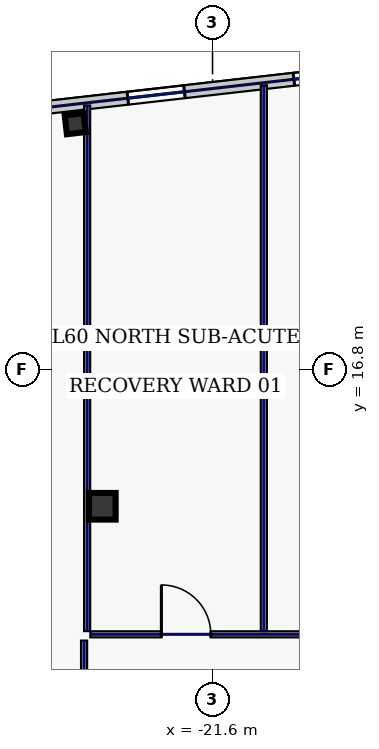
"""IFC4 building model, lengths in metres.
Left out: names, types, materials, properties, quantities, classifications, styles, units other than length and angle.
Written with IfcOpenShell. Run it as: python <this file> out.ifc"""

import sys

from ifc_helpers import new_model, si_unit, direction, frame, frame_2d, origin, origin_2d, place, context, subcontext, project, spatial, rectangle, hollow_rectangle, extrude, element, fill, save


model = new_model("IFC4")
c1 = context("Model", 3, precision=1e-05, world=origin(), true_north=direction((0.0, 1.0)))
c2 = subcontext(c1, "Body", "Model", "MODEL_VIEW")
j1 = project(units=[si_unit("LENGTHUNIT", "METRE"), si_unit("PLANEANGLEUNIT", "RADIAN")], contexts=[c1])
p1 = place(None, origin())
s1 = spatial("IfcSite", under=j1, at=p1, CompositionType="ELEMENT")
p2 = place(p1, origin())
s2 = spatial("IfcBuilding", under=s1, at=p2, CompositionType="ELEMENT")
p3 = place(p2, frame((0.0, 0.0, 259.0)))
s3 = spatial("IfcBuildingStorey", under=s2, at=p3, CompositionType="ELEMENT", Elevation=259.0)
p4 = place(p3, frame((-24.5, 13.2, 0.0), z_axis=(0.0, 0.0, 1.0), x_axis=(1.0, 0.0, 0.0)))
e1 = element("IfcColumn", 1, at=p4, inside=s3, PredefinedType="COLUMN", context=c2, shape_type="SweptSolid", body=[
    extrude(hollow_rectangle(XDim=0.7, YDim=0.7, WallThickness=0.032, at=origin_2d()), origin(), (0.0, 0.0, 1.0), 3.74),
])
p5 = place(p3, frame((-25.212, 23.268, 0.0), z_axis=(0.0, 0.0, 1.0), x_axis=(0.993571855677, 0.113203213768, 0.0)))
e2 = element("IfcColumn", 2, at=p5, inside=s3, PredefinedType="COLUMN", context=c2, shape_type="SweptSolid", body=[
    extrude(hollow_rectangle(XDim=0.5, YDim=0.5, WallThickness=0.025, at=origin_2d()), origin(), (0.0, 0.0, 1.0), 3.74),
])
p6 = place(p3, frame((-15.51, 24.886, 0.0), z_axis=(0.0, 0.0, 1.0), x_axis=(-0.993572271362, -0.113199565282, 0.0)))
e3 = element("IfcWall", 3, at=p6, inside=s3, PredefinedType="STANDARD", context=c2, shape_type="SweptSolid", body=[
    extrude(rectangle(XDim=18.651, YDim=0.34, at=frame_2d((9.326, 0.0))), origin(), (0.0, 0.0, 1.0), 3.74),
])
p7 = place(p6, frame((15.021, 0.0, 0.83)))
e4 = element("IfcOpeningElement", 4, at=p7, cuts=e3, PredefinedType="OPENING", context=c2, shape_type="SweptSolid", body=[
    extrude(rectangle(XDim=1.5, YDim=2.0, at=frame_2d((0.75, 1.0))), frame((0.0, 0.18, 0.0), z_axis=(0.0, -1.0, 0.0), x_axis=(1.0, 0.0, 0.0)), (0.0, 0.0, 1.0), 0.36),
])
p8 = place(p6, frame((11.273, 0.0, 0.83)))
e5 = element("IfcOpeningElement", 5, at=p8, cuts=e3, PredefinedType="OPENING", context=c2, shape_type="SweptSolid", body=[
    extrude(rectangle(XDim=1.5, YDim=2.0, at=frame_2d((0.75, 1.0))), frame((0.0, 0.18, 0.0), z_axis=(0.0, -1.0, 0.0), x_axis=(1.0, 0.0, 0.0)), (0.0, 0.0, 1.0), 0.36),
])
p9 = place(p6, frame((6.873, 0.0, 0.83)))
e6 = element("IfcOpeningElement", 6, at=p9, cuts=e3, PredefinedType="OPENING", context=c2, shape_type="SweptSolid", body=[
    extrude(rectangle(XDim=1.5, YDim=2.0, at=frame_2d((0.75, 1.0))), frame((0.0, 0.18, 0.0), z_axis=(0.0, -1.0, 0.0), x_axis=(1.0, 0.0, 0.0)), (0.0, 0.0, 1.0), 0.36),
])
p10 = place(p6, frame((3.125, 0.0, 0.83)))
e7 = element("IfcOpeningElement", 7, at=p10, cuts=e3, PredefinedType="OPENING", context=c2, shape_type="SweptSolid", body=[
    extrude(rectangle(XDim=0.85, YDim=1.85, at=frame_2d((0.425, 0.925))), frame((0.0, 0.18, 0.0), z_axis=(0.0, -1.0, 0.0), x_axis=(1.0, 0.0, 0.0)), (0.0, 0.0, 1.0), 0.36),
])
p11 = place(p3, frame((-24.98, -9.615, 0.0), z_axis=(0.0, 0.0, 1.0), x_axis=(0.0, 1.0, 0.0)))
e8 = element("IfcWall", 8, at=p11, inside=s3, PredefinedType="PARTITIONING", context=c2, shape_type="SweptSolid", body=[
    extrude(rectangle(XDim=19.28, YDim=0.16, at=frame_2d((9.64, 0.0))), origin(), (0.0, 0.0, 1.0), 3.74),
])
p12 = place(p11, frame((1.969, 0.0, 0.0)))
e9 = element("IfcOpeningElement", 9, at=p12, cuts=e8, PredefinedType="OPENING", context=c2, shape_type="SweptSolid", body=[
    extrude(rectangle(XDim=0.95, YDim=2.2, at=frame_2d((0.475, 1.1))), frame((0.0, 0.09, 0.0), z_axis=(0.0, -1.0, 0.0), x_axis=(1.0, 0.0, 0.0)), (0.0, 0.0, 1.0), 0.18),
])
p13 = place(p11, frame((7.25, 0.0, 0.0)))
e10 = element("IfcOpeningElement", 10, at=p13, cuts=e8, PredefinedType="OPENING", context=c2, shape_type="SweptSolid", body=[
    extrude(rectangle(XDim=0.95, YDim=2.2, at=frame_2d((0.475, 1.1))), frame((0.0, 0.09, 0.0), z_axis=(0.0, -1.0, 0.0), x_axis=(1.0, 0.0, 0.0)), (0.0, 0.0, 1.0), 0.18),
])
p14 = place(p11, frame((12.45, 0.0, 0.0)))
e11 = element("IfcOpeningElement", 11, at=p14, cuts=e8, PredefinedType="OPENING", context=c2, shape_type="SweptSolid", body=[
    extrude(rectangle(XDim=0.95, YDim=2.2, at=frame_2d((0.475, 1.1))), frame((0.0, 0.09, 0.0), z_axis=(0.0, -1.0, 0.0), x_axis=(1.0, 0.0, 0.0)), (0.0, 0.0, 1.0), 0.18),
])
p15 = place(p11, frame((16.506, 0.0, 0.0)))
e12 = element("IfcOpeningElement", 12, at=p15, cuts=e8, PredefinedType="OPENING", context=c2, shape_type="SweptSolid", body=[
    extrude(rectangle(XDim=0.95, YDim=2.2, at=frame_2d((0.475, 1.1))), frame((0.0, 0.09, 0.0), z_axis=(0.0, -1.0, 0.0), x_axis=(1.0, 0.0, 0.0)), (0.0, 0.0, 1.0), 0.18),
])
p16 = place(p3, frame((-24.815, 9.83, 0.0), z_axis=(0.0, 0.0, 1.0), x_axis=(1.0, 0.0, 0.0)))
e13 = element("IfcWall", 13, at=p16, inside=s3, PredefinedType="PARTITIONING", context=c2, shape_type="SweptSolid", body=[
    extrude(rectangle(XDim=49.63, YDim=0.16, at=frame_2d((24.815, 0.0))), origin(), (0.0, 0.0, 1.0), 3.74),
])
p17 = place(p16, frame((1.869, 0.0, 0.0)))
e14 = element("IfcOpeningElement", 14, at=p17, cuts=e13, PredefinedType="OPENING", context=c2, shape_type="SweptSolid", body=[
    extrude(rectangle(XDim=1.3, YDim=2.2, at=frame_2d((0.65, 1.1))), frame((0.0, 0.09, 0.0), z_axis=(0.0, -1.0, 0.0), x_axis=(1.0, 0.0, 0.0)), (0.0, 0.0, 1.0), 0.18),
])
p18 = place(p16, frame((7.613, 0.0, 0.0)))
e15 = element("IfcOpeningElement", 15, at=p18, cuts=e13, PredefinedType="OPENING", context=c2, shape_type="SweptSolid", body=[
    extrude(rectangle(XDim=0.95, YDim=2.2, at=frame_2d((0.475, 1.1))), frame((0.0, 0.09, 0.0), z_axis=(0.0, -1.0, 0.0), x_axis=(1.0, 0.0, 0.0)), (0.0, 0.0, 1.0), 0.18),
])
p19 = place(p16, frame((14.038, 0.0, 0.0)))
e16 = element("IfcOpeningElement", 16, at=p19, cuts=e13, PredefinedType="OPENING", context=c2, shape_type="SweptSolid", body=[
    extrude(rectangle(XDim=0.95, YDim=2.2, at=frame_2d((0.475, 1.1))), frame((0.0, 0.09, 0.0), z_axis=(0.0, -1.0, 0.0), x_axis=(1.0, 0.0, 0.0)), (0.0, 0.0, 1.0), 0.18),
])
p20 = place(p16, frame((21.125, 0.0, 0.0)))
e17 = element("IfcOpeningElement", 17, at=p20, cuts=e13, PredefinedType="OPENING", context=c2, shape_type="SweptSolid", body=[
    extrude(rectangle(XDim=1.3, YDim=2.2, at=frame_2d((0.65, 1.1))), frame((0.0, 0.09, 0.0), z_axis=(0.0, -1.0, 0.0), x_axis=(1.0, 0.0, 0.0)), (0.0, 0.0, 1.0), 0.18),
])
p21 = place(p16, frame((29.225, 0.0, 0.0)))
e18 = element("IfcOpeningElement", 18, at=p21, cuts=e13, PredefinedType="OPENING", context=c2, shape_type="SweptSolid", body=[
    extrude(rectangle(XDim=1.3, YDim=2.2, at=frame_2d((0.65, 1.1))), frame((0.0, 0.09, 0.0), z_axis=(0.0, -1.0, 0.0), x_axis=(1.0, 0.0, 0.0)), (0.0, 0.0, 1.0), 0.18),
])
p22 = place(p16, frame((36.312, 0.0, 0.0)))
e19 = element("IfcOpeningElement", 19, at=p22, cuts=e13, PredefinedType="OPENING", context=c2, shape_type="SweptSolid", body=[
    extrude(rectangle(XDim=0.95, YDim=2.2, at=frame_2d((0.475, 1.1))), frame((0.0, 0.09, 0.0), z_axis=(0.0, -1.0, 0.0), x_axis=(1.0, 0.0, 0.0)), (0.0, 0.0, 1.0), 0.18),
])
p23 = place(p16, frame((41.863, 0.0, 0.0)))
e20 = element("IfcOpeningElement", 20, at=p23, cuts=e13, PredefinedType="OPENING", context=c2, shape_type="SweptSolid", body=[
    extrude(rectangle(XDim=1.3, YDim=2.2, at=frame_2d((0.65, 1.1))), frame((0.0, 0.09, 0.0), z_axis=(0.0, -1.0, 0.0), x_axis=(1.0, 0.0, 0.0)), (0.0, 0.0, 1.0), 0.18),
])
p24 = place(p16, frame((46.806, 0.0, 0.0)))
e21 = element("IfcOpeningElement", 21, at=p24, cuts=e13, PredefinedType="OPENING", context=c2, shape_type="SweptSolid", body=[
    extrude(rectangle(XDim=0.95, YDim=2.2, at=frame_2d((0.475, 1.1))), frame((0.0, 0.09, 0.0), z_axis=(0.0, -1.0, 0.0), x_axis=(1.0, 0.0, 0.0)), (0.0, 0.0, 1.0), 0.18),
])
p25 = place(p3, frame((-24.9, 9.915, 0.0), z_axis=(0.0, 0.0, 1.0), x_axis=(0.0, 1.0, 0.0)))
e22 = element("IfcWall", 22, at=p25, inside=s3, PredefinedType="PARTITIONING", context=c2, shape_type="SweptSolid", body=[
    extrude(rectangle(XDim=13.831, YDim=0.16, at=frame_2d((6.916, 0.0))), origin(), (0.0, 0.0, 1.0), 3.285),
])
p26 = place(p3, frame((-20.25, 9.915, 0.0), z_axis=(0.0, 0.0, 1.0), x_axis=(0.0, 1.0, 0.0)))
e23 = element("IfcWall", 23, at=p26, inside=s3, PredefinedType="PARTITIONING", context=c2, shape_type="SweptSolid", body=[
    extrude(rectangle(XDim=14.361, YDim=0.16, at=frame_2d((7.181, 0.0))), origin(), (0.0, 0.0, 1.0), 3.74),
])
p27 = place(p9, origin())
e24 = element("IfcWindow", 24, at=p27, inside=s3, PartitioningType="SINGLE_PANEL", PredefinedType="WINDOW", context=c2, shape_type="SweptSolid", body=[
    extrude(rectangle(XDim=1.5, YDim=2.0, at=frame_2d((0.75, 1.0))), frame((0.0, 0.03, 0.0), z_axis=(0.0, -1.0, 0.0), x_axis=(1.0, 0.0, 0.0)), (0.0, 0.0, 1.0), 0.06),
])
fill(e6, e24)
p28 = place(p10, origin())
e25 = element("IfcWindow", 25, at=p28, inside=s3, PartitioningType="SINGLE_PANEL", PredefinedType="WINDOW", context=c2, shape_type="SweptSolid", body=[
    extrude(rectangle(XDim=0.85, YDim=1.85, at=frame_2d((0.425, 0.925))), frame((0.0, 0.03, 0.0), z_axis=(0.0, -1.0, 0.0), x_axis=(1.0, 0.0, 0.0)), (0.0, 0.0, 1.0), 0.06),
])
fill(e7, e25)
p29 = place(p17, origin())
e26 = element("IfcDoor", 26, at=p29, inside=s3, OperationType="SINGLE_SWING_LEFT", PredefinedType="DOOR", context=c2, shape_type="SweptSolid", body=[
    extrude(rectangle(XDim=1.3, YDim=2.2, at=frame_2d((0.65, 1.1))), frame((0.0, 0.025, 0.0), z_axis=(0.0, -1.0, 0.0), x_axis=(1.0, 0.0, 0.0)), (0.0, 0.0, 1.0), 0.05),
])
fill(e14, e26)
save(model, sys.argv[1])
